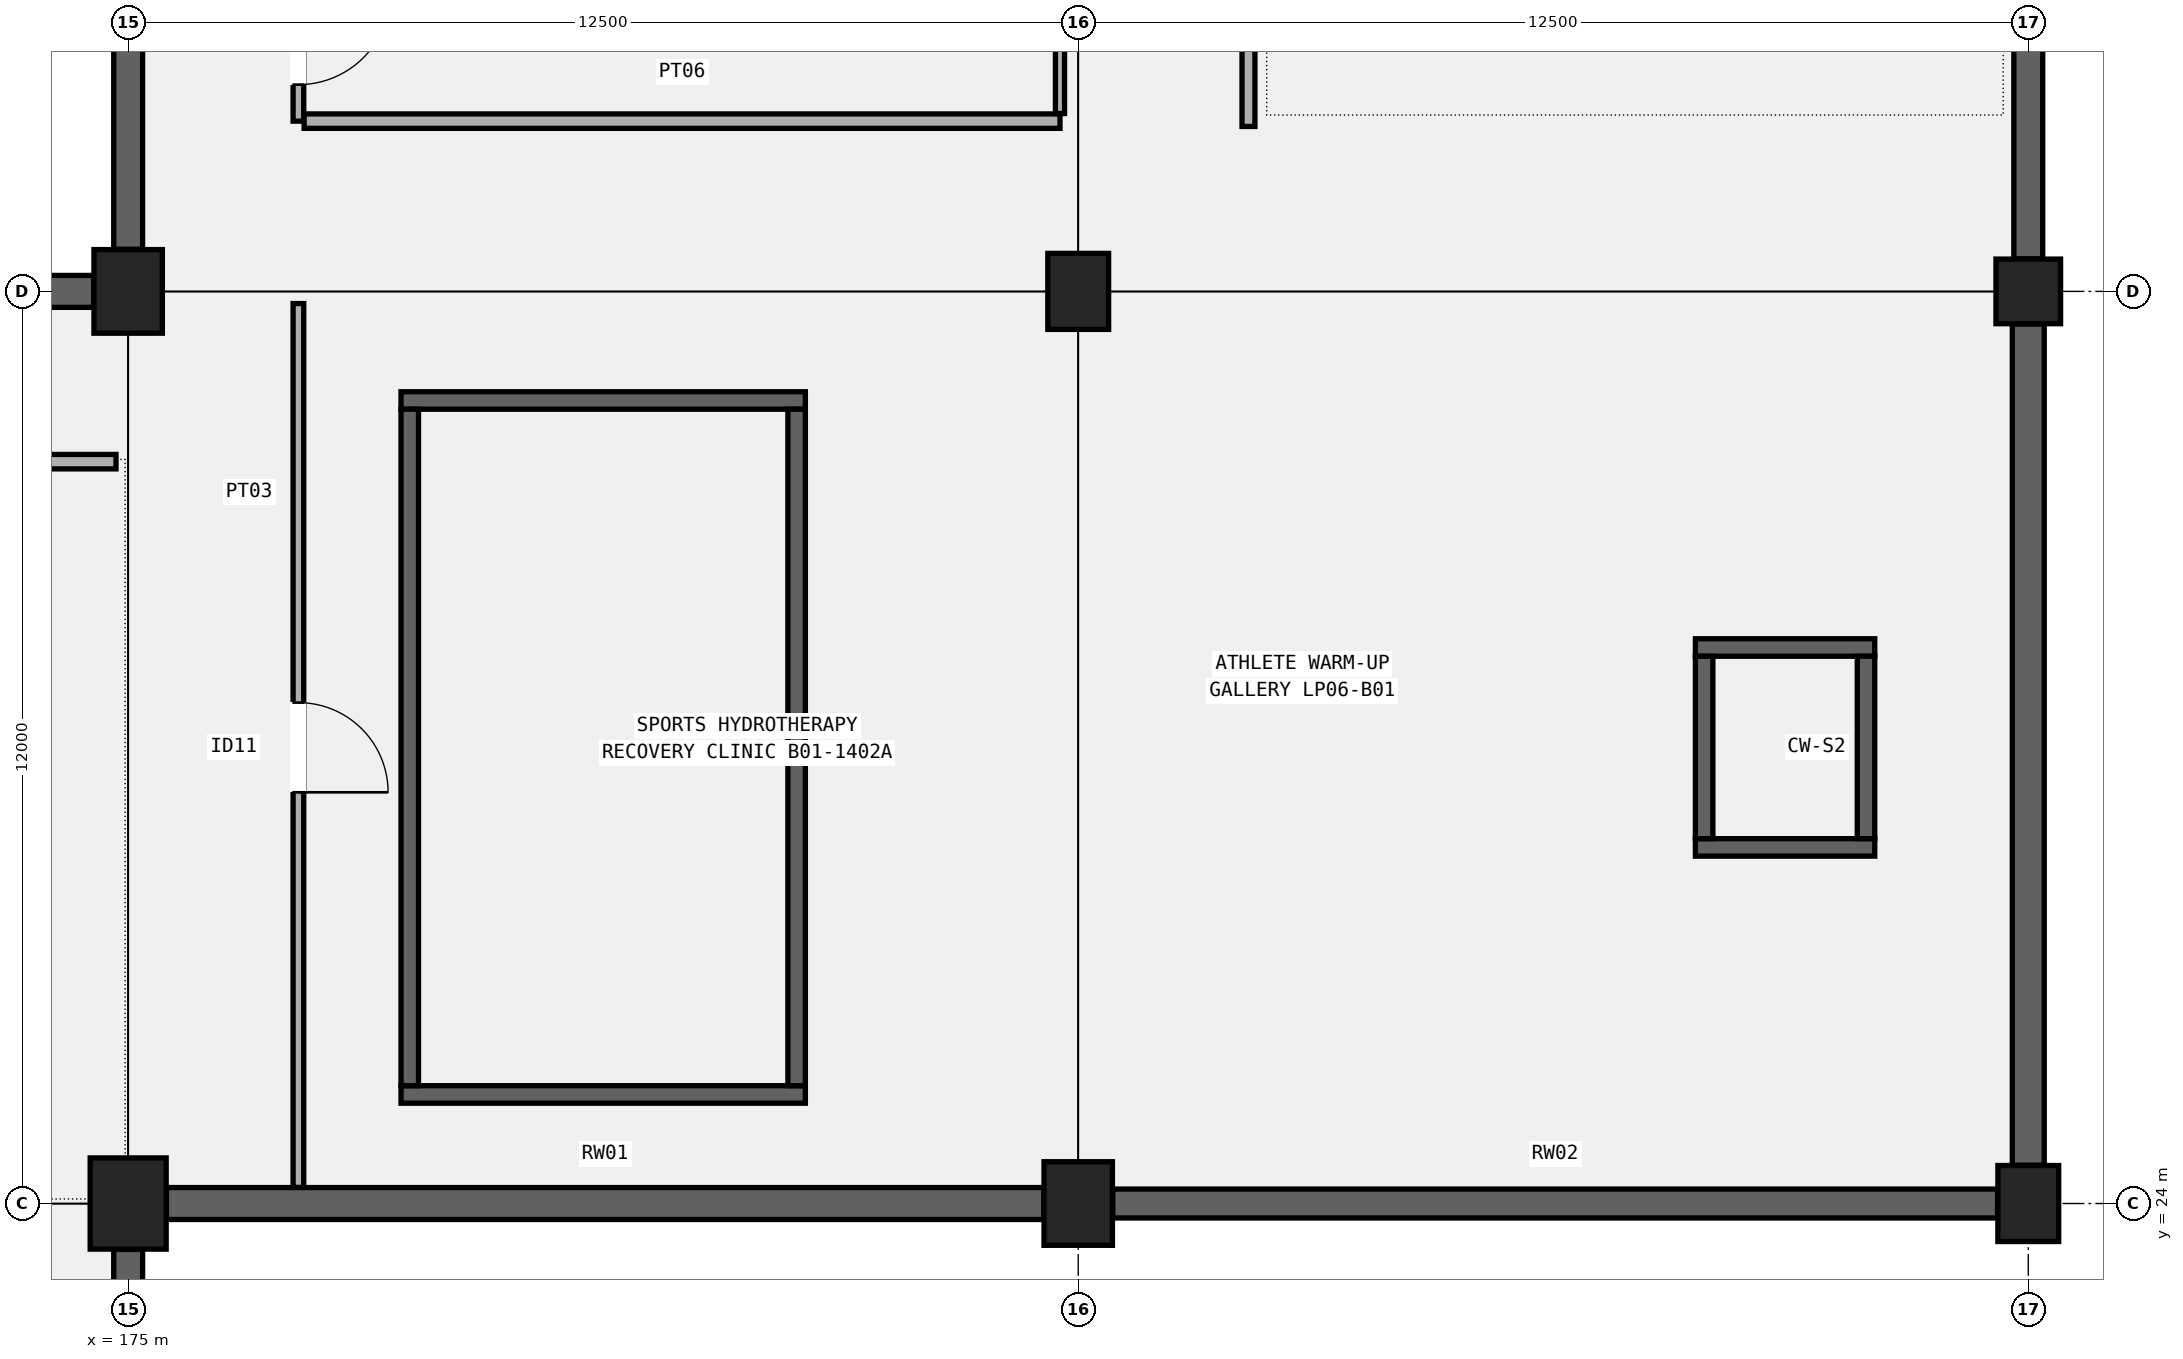
"""IFC4 building model, lengths in metres.
Left out: names, types, materials, properties, quantities, classifications, styles, units other than length and angle.
Written with IfcOpenShell. Run it as: python <this file> out.ifc"""

import sys

from ifc_helpers import new_model, si_unit, direction, frame, frame_2d, origin, origin_2d, place, context, subcontext, project, spatial, rectangle, circle, extrude, element, fill, save


model = new_model("IFC4")
c1 = context("Model", 3, precision=1e-05, world=origin(), true_north=direction((0.0, 1.0)))
c2 = subcontext(c1, "Body", "Model", "MODEL_VIEW")
j1 = project(units=[si_unit("LENGTHUNIT", "METRE"), si_unit("PLANEANGLEUNIT", "RADIAN")], contexts=[c1])
p1 = place(None, origin())
s1 = spatial("IfcSite", under=j1, at=p1, CompositionType="ELEMENT")
p2 = place(p1, origin())
s2 = spatial("IfcBuilding", under=s1, at=p2, CompositionType="ELEMENT")
p3 = place(p2, frame((0.0, 0.0, -4.8)))
s3 = spatial("IfcBuildingStorey", under=s2, at=p3, CompositionType="ELEMENT", Elevation=-4.8)
p4 = place(p3, frame((175.0, 24.0, 0.0), z_axis=(0.0, 0.0, 1.0), x_axis=(1.0, 0.0, 0.0)))
e1 = element("IfcColumn", 1, at=p4, inside=s3, PredefinedType="COLUMN", context=c2, shape_type="SweptSolid", body=[
    extrude(rectangle(XDim=1.0, YDim=1.2, at=origin_2d()), origin(), (0.0, 0.0, 1.0), 4.8),
])
for number, where, z_axis, x_axis in (
    (2, (175.0, 36.0, 0.0), (0.0, 0.0, 1.0), (1.0, 0.0, 0.0)),
    (3, (187.5, 24.0, 0.0), (0.0, 0.0, 1.0), (1.0, 0.0, 0.0)),
):
    element("IfcColumn", number, at=place(p3, frame(where, z_axis=z_axis, x_axis=x_axis)), inside=s3, PredefinedType="COLUMN", context=c2, shape_type="SweptSolid", body=[
        extrude(rectangle(XDim=0.9, YDim=1.1, at=origin_2d()), origin(), (0.0, 0.0, 1.0), 4.8),
    ])
for number, where, z_axis, x_axis in (
    (4, (187.5, 36.0, 0.0), (0.0, 0.0, 1.0), (1.0, 0.0, 0.0)),
    (5, (200.0, 24.0, 0.0), (0.0, 0.0, 1.0), (1.0, 0.0, 0.0)),
):
    element("IfcColumn", number, at=place(p3, frame(where, z_axis=z_axis, x_axis=x_axis)), inside=s3, PredefinedType="COLUMN", context=c2, shape_type="SweptSolid", body=[
        extrude(rectangle(XDim=0.8, YDim=1.0, at=origin_2d()), origin(), (0.0, 0.0, 1.0), 4.8),
    ])
p5 = place(p3, frame((200.0, 36.0, 0.0), z_axis=(0.0, 0.0, 1.0), x_axis=(1.0, 0.0, 0.0)))
e6 = element("IfcColumn", 6, at=p5, inside=s3, PredefinedType="COLUMN", context=c2, shape_type="SweptSolid", body=[
    extrude(circle(Radius=0.425, at=origin_2d()), origin(), (0.0, 0.0, 1.0), 4.8),
])
p6 = place(p3, frame((175.0, 12.429, 0.0), z_axis=(0.0, 0.0, 1.0), x_axis=(0.0, 1.0, 0.0)))
e7 = element("IfcWall", 7, at=p6, inside=s3, PredefinedType="STANDARD", context=c2, shape_type="SweptSolid", body=[
    extrude(rectangle(XDim=10.967, YDim=0.38, at=frame_2d((5.483, 0.0))), origin(), (0.0, 0.0, 1.0), 4.46),
])
for number, where, z_axis, x_axis in (
    (8, (163.004, 36.0, 0.0), (0.0, 0.0, 1.0), (1.0, 0.0, 0.0)),
    (9, (175.504, 24.0, 0.0), (0.0, 0.0, 1.0), (1.0, 0.0, 0.0)),
):
    element("IfcWall", number, at=place(p3, frame(where, z_axis=z_axis, x_axis=x_axis)), inside=s3, PredefinedType="STANDARD", context=c2, shape_type="SweptSolid", body=[
        extrude(rectangle(XDim=11.542, YDim=0.42, at=frame_2d((5.771, 0.0))), origin(), (0.0, 0.0, 1.0), 4.46),
    ])
p7 = place(p3, frame((175.0, 36.554, 0.0), z_axis=(0.0, 0.0, 1.0), x_axis=(0.0, 1.0, 0.0)))
e10 = element("IfcWall", 10, at=p7, inside=s3, PredefinedType="STANDARD", context=c2, shape_type="SweptSolid", body=[
    extrude(rectangle(XDim=10.942, YDim=0.38, at=frame_2d((5.471, 0.0))), origin(), (0.0, 0.0, 1.0), 4.46),
])
p8 = place(p3, frame((187.954, 24.0, 0.0), z_axis=(0.0, 0.0, 1.0), x_axis=(1.0, 0.0, 0.0)))
e11 = element("IfcWall", 11, at=p8, inside=s3, PredefinedType="STANDARD", context=c2, shape_type="SweptSolid", body=[
    extrude(rectangle(XDim=11.642, YDim=0.38, at=frame_2d((5.821, 0.0))), origin(), (0.0, 0.0, 1.0), 4.46),
])
p9 = place(p3, frame((200.0, 24.504, 0.0), z_axis=(0.0, 0.0, 1.0), x_axis=(0.0, 1.0, 0.0)))
e12 = element("IfcWall", 12, at=p9, inside=s3, PredefinedType="STANDARD", context=c2, shape_type="SweptSolid", body=[
    extrude(rectangle(XDim=11.067, YDim=0.42, at=frame_2d((5.534, 0.0))), origin(), (0.0, 0.0, 1.0), 4.46),
])
p10 = place(p3, frame((200.0, 36.429, 0.0), z_axis=(0.0, 0.0, 1.0), x_axis=(0.0, 1.0, 0.0)))
e13 = element("IfcWall", 13, at=p10, inside=s3, PredefinedType="STANDARD", context=c2, shape_type="SweptSolid", body=[
    extrude(rectangle(XDim=10.967, YDim=0.38, at=frame_2d((5.483, 0.0))), origin(), (0.0, 0.0, 1.0), 4.46),
])
for number, where, z_axis, x_axis in (
    (14, (178.59, 25.435, 0.0), (0.0, 0.0, 1.0), (1.0, 0.0, 0.0)),
    (15, (178.59, 34.565, 0.0), (0.0, 0.0, 1.0), (1.0, 0.0, 0.0)),
):
    element("IfcWall", number, at=place(p3, frame(where, z_axis=z_axis, x_axis=x_axis)), inside=s3, PredefinedType="SHEAR", context=c2, shape_type="SweptSolid", body=[
        extrude(rectangle(XDim=5.32, YDim=0.23, at=frame_2d((2.66, 0.0))), origin(), (0.0, 0.0, 1.0), 4.5),
    ])
for number, where, z_axis, x_axis in (
    (16, (178.705, 25.55, 0.0), (0.0, 0.0, 1.0), (0.0, 1.0, 0.0)),
    (17, (183.795, 25.55, 0.0), (0.0, 0.0, 1.0), (0.0, 1.0, 0.0)),
):
    element("IfcWall", number, at=place(p3, frame(where, z_axis=z_axis, x_axis=x_axis)), inside=s3, PredefinedType="SHEAR", context=c2, shape_type="SweptSolid", body=[
        extrude(rectangle(XDim=8.9, YDim=0.23, at=frame_2d((4.45, 0.0))), origin(), (0.0, 0.0, 1.0), 4.5),
    ])
for number, where, z_axis, x_axis in (
    (18, (195.62, 28.685, -0.65), (0.0, 0.0, 1.0), (1.0, 0.0, 0.0)),
    (19, (195.62, 31.315, -0.65), (0.0, 0.0, 1.0), (1.0, 0.0, 0.0)),
):
    element("IfcWall", number, at=place(p3, frame(where, z_axis=z_axis, x_axis=x_axis)), inside=s3, PredefinedType="SHEAR", context=c2, shape_type="SweptSolid", body=[
        extrude(rectangle(XDim=2.36, YDim=0.23, at=frame_2d((1.18, 0.0))), origin(), (0.0, 0.0, 1.0), 4.5),
    ])
for number, where, z_axis, x_axis in (
    (20, (195.735, 28.8, -0.65), (0.0, 0.0, 1.0), (0.0, 1.0, 0.0)),
    (21, (197.865, 28.8, -0.65), (0.0, 0.0, 1.0), (0.0, 1.0, 0.0)),
):
    element("IfcWall", number, at=place(p3, frame(where, z_axis=z_axis, x_axis=x_axis)), inside=s3, PredefinedType="SHEAR", context=c2, shape_type="SweptSolid", body=[
        extrude(rectangle(XDim=2.4, YDim=0.23, at=frame_2d((1.2, 0.0))), origin(), (0.0, 0.0, 1.0), 4.5),
    ])
p11 = place(p3, frame((162.66, 33.76, 0.0), z_axis=(0.0, 0.0, 1.0), x_axis=(1.0, 0.0, 0.0)))
e22 = element("IfcWall", 22, at=p11, inside=s3, PredefinedType="PARTITIONING", context=c2, shape_type="SweptSolid", body=[
    extrude(rectangle(XDim=12.18, YDim=0.19, at=frame_2d((6.09, 0.0))), origin(), (0.0, 0.0, 1.0), 3.92),
])
p12 = place(p11, frame((2.676, 0.0, 0.0), z_axis=(0.0, 0.0, 1.0), x_axis=(-1.0, 0.0, 0.0)))
e23 = element("IfcOpeningElement", 23, at=p12, cuts=e22, PredefinedType="OPENING", context=c2, shape_type="SweptSolid", body=[
    extrude(rectangle(XDim=1.12, YDim=2.18, at=frame_2d((0.56, 1.09))), frame((0.0, 0.105, 0.0), z_axis=(0.0, -1.0, 0.0), x_axis=(1.0, 0.0, 0.0)), (0.0, 0.0, 1.0), 0.21),
])
p13 = place(p11, frame((8.861, 0.0, 0.0), z_axis=(0.0, 0.0, 1.0), x_axis=(-1.0, 0.0, 0.0)))
e24 = element("IfcOpeningElement", 24, at=p13, cuts=e22, PredefinedType="OPENING", context=c2, shape_type="SweptSolid", body=[
    extrude(rectangle(XDim=1.15, YDim=2.15, at=frame_2d((0.575, 1.075))), frame((0.0, 0.105, 0.0), z_axis=(0.0, -1.0, 0.0), x_axis=(1.0, 0.0, 0.0)), (0.0, 0.0, 1.0), 0.21),
])
p14 = place(p3, frame((177.24, 24.212, 0.0), z_axis=(0.0, 0.0, 1.0), x_axis=(0.0, 1.0, 0.0)))
e25 = element("IfcWall", 25, at=p14, inside=s3, PredefinedType="PARTITIONING", context=c2, shape_type="SweptSolid", body=[
    extrude(rectangle(XDim=11.628, YDim=0.14, at=frame_2d((5.814, 0.0))), origin(), (0.0, 0.0, 1.0), 3.92),
])
p15 = place(p14, frame((6.378, 0.0, 0.0), z_axis=(0.0, 0.0, 1.0), x_axis=(-1.0, 0.0, 0.0)))
e26 = element("IfcOpeningElement", 26, at=p15, cuts=e25, PredefinedType="OPENING", context=c2, shape_type="SweptSolid", body=[
    extrude(rectangle(XDim=1.18, YDim=2.2, at=frame_2d((0.59, 1.1))), frame((0.0, 0.08, 0.0), z_axis=(0.0, -1.0, 0.0), x_axis=(1.0, 0.0, 0.0)), (0.0, 0.0, 1.0), 0.16),
])
p16 = place(p3, frame((177.24, 38.24, 0.0), z_axis=(0.0, 0.0, 1.0), x_axis=(0.0, 1.0, 0.0)))
e27 = element("IfcWall", 27, at=p16, inside=s3, PredefinedType="PARTITIONING", context=c2, shape_type="SweptSolid", body=[
    extrude(rectangle(XDim=9.52, YDim=0.14, at=frame_2d((4.76, 0.0))), origin(), (0.0, 0.0, 1.0), 3.92),
])
p17 = place(p16, frame((1.69, 0.0, 0.0), z_axis=(0.0, 0.0, 1.0), x_axis=(-1.0, 0.0, 0.0)))
e28 = element("IfcOpeningElement", 28, at=p17, cuts=e27, PredefinedType="OPENING", context=c2, shape_type="SweptSolid", body=[
    extrude(rectangle(XDim=1.21, YDim=2.18, at=frame_2d((0.605, 1.09))), frame((0.0, 0.08, 0.0), z_axis=(0.0, -1.0, 0.0), x_axis=(1.0, 0.0, 0.0)), (0.0, 0.0, 1.0), 0.16),
])
p18 = place(p16, frame((4.628, 0.0, 0.0), z_axis=(0.0, 0.0, 1.0), x_axis=(-1.0, 0.0, 0.0)))
e29 = element("IfcOpeningElement", 29, at=p18, cuts=e27, PredefinedType="OPENING", context=c2, shape_type="SweptSolid", body=[
    extrude(rectangle(XDim=1.24, YDim=2.22, at=frame_2d((0.62, 1.11))), frame((0.0, 0.08, 0.0), z_axis=(0.0, -1.0, 0.0), x_axis=(1.0, 0.0, 0.0)), (0.0, 0.0, 1.0), 0.16),
])
p19 = place(p16, frame((8.318, 0.0, 0.0), z_axis=(0.0, 0.0, 1.0), x_axis=(-1.0, 0.0, 0.0)))
e30 = element("IfcOpeningElement", 30, at=p19, cuts=e27, PredefinedType="OPENING", context=c2, shape_type="SweptSolid", body=[
    extrude(rectangle(XDim=1.27, YDim=2.2, at=frame_2d((0.635, 1.1))), frame((0.0, 0.08, 0.0), z_axis=(0.0, -1.0, 0.0), x_axis=(1.0, 0.0, 0.0)), (0.0, 0.0, 1.0), 0.16),
])
p20 = place(p3, frame((177.315, 38.24, 0.0), z_axis=(0.0, 0.0, 1.0), x_axis=(1.0, 0.0, 0.0)))
e31 = element("IfcWall", 31, at=p20, inside=s3, PredefinedType="PARTITIONING", context=c2, shape_type="SweptSolid", body=[
    extrude(rectangle(XDim=9.945, YDim=0.19, at=frame_2d((4.973, 0.0))), origin(), (0.0, 0.0, 1.0), 3.92),
])
p21 = place(p3, frame((187.26, 38.34, 0.0), z_axis=(0.0, 0.0, 1.0), x_axis=(0.0, 1.0, 0.0)))
e32 = element("IfcWall", 32, at=p21, inside=s3, PredefinedType="PARTITIONING", context=c2, shape_type="SweptSolid", body=[
    extrude(rectangle(XDim=9.231, YDim=0.12, at=frame_2d((4.615, 0.0))), origin(), (0.0, 0.0, 1.0), 3.52),
])
p22 = place(p3, frame((189.74, 38.17, 0.0), z_axis=(0.0, 0.0, 1.0), x_axis=(0.0, 1.0, 0.0)))
e33 = element("IfcWall", 33, at=p22, inside=s3, PredefinedType="PARTITIONING", context=c2, shape_type="SweptSolid", body=[
    extrude(rectangle(XDim=9.67, YDim=0.17, at=frame_2d((4.835, 0.0))), origin(), (0.0, 0.0, 1.0), 3.92),
])
p23 = place(p22, frame((5.31, 0.0, 0.0), z_axis=(0.0, 0.0, 1.0), x_axis=(-1.0, 0.0, 0.0)))
e34 = element("IfcOpeningElement", 34, at=p23, cuts=e33, PredefinedType="OPENING", context=c2, shape_type="SweptSolid", body=[
    extrude(rectangle(XDim=0.95, YDim=2.12, at=frame_2d((0.475, 1.06))), frame((0.0, 0.095, 0.0), z_axis=(0.0, -1.0, 0.0), x_axis=(1.0, 0.0, 0.0)), (0.0, 0.0, 1.0), 0.19),
])
p24 = place(p15, origin())
e35 = element("IfcDoor", 35, at=p24, inside=s3, OperationType="SINGLE_SWING_RIGHT", PredefinedType="DOOR", context=c2, shape_type="SweptSolid", body=[
    extrude(rectangle(XDim=1.18, YDim=2.2, at=frame_2d((0.59, 1.1))), frame((0.0, 0.025, 0.0), z_axis=(0.0, -1.0, 0.0), x_axis=(1.0, 0.0, 0.0)), (0.0, 0.0, 1.0), 0.05),
])
fill(e26, e35)
p25 = place(p17, origin())
e36 = element("IfcDoor", 36, at=p25, inside=s3, OperationType="SINGLE_SWING_LEFT", PredefinedType="DOOR", context=c2, shape_type="SweptSolid", body=[
    extrude(rectangle(XDim=1.21, YDim=2.18, at=frame_2d((0.605, 1.09))), frame((0.0, 0.025, 0.0), z_axis=(0.0, -1.0, 0.0), x_axis=(1.0, 0.0, 0.0)), (0.0, 0.0, 1.0), 0.05),
])
fill(e28, e36)
save(model, sys.argv[1])
